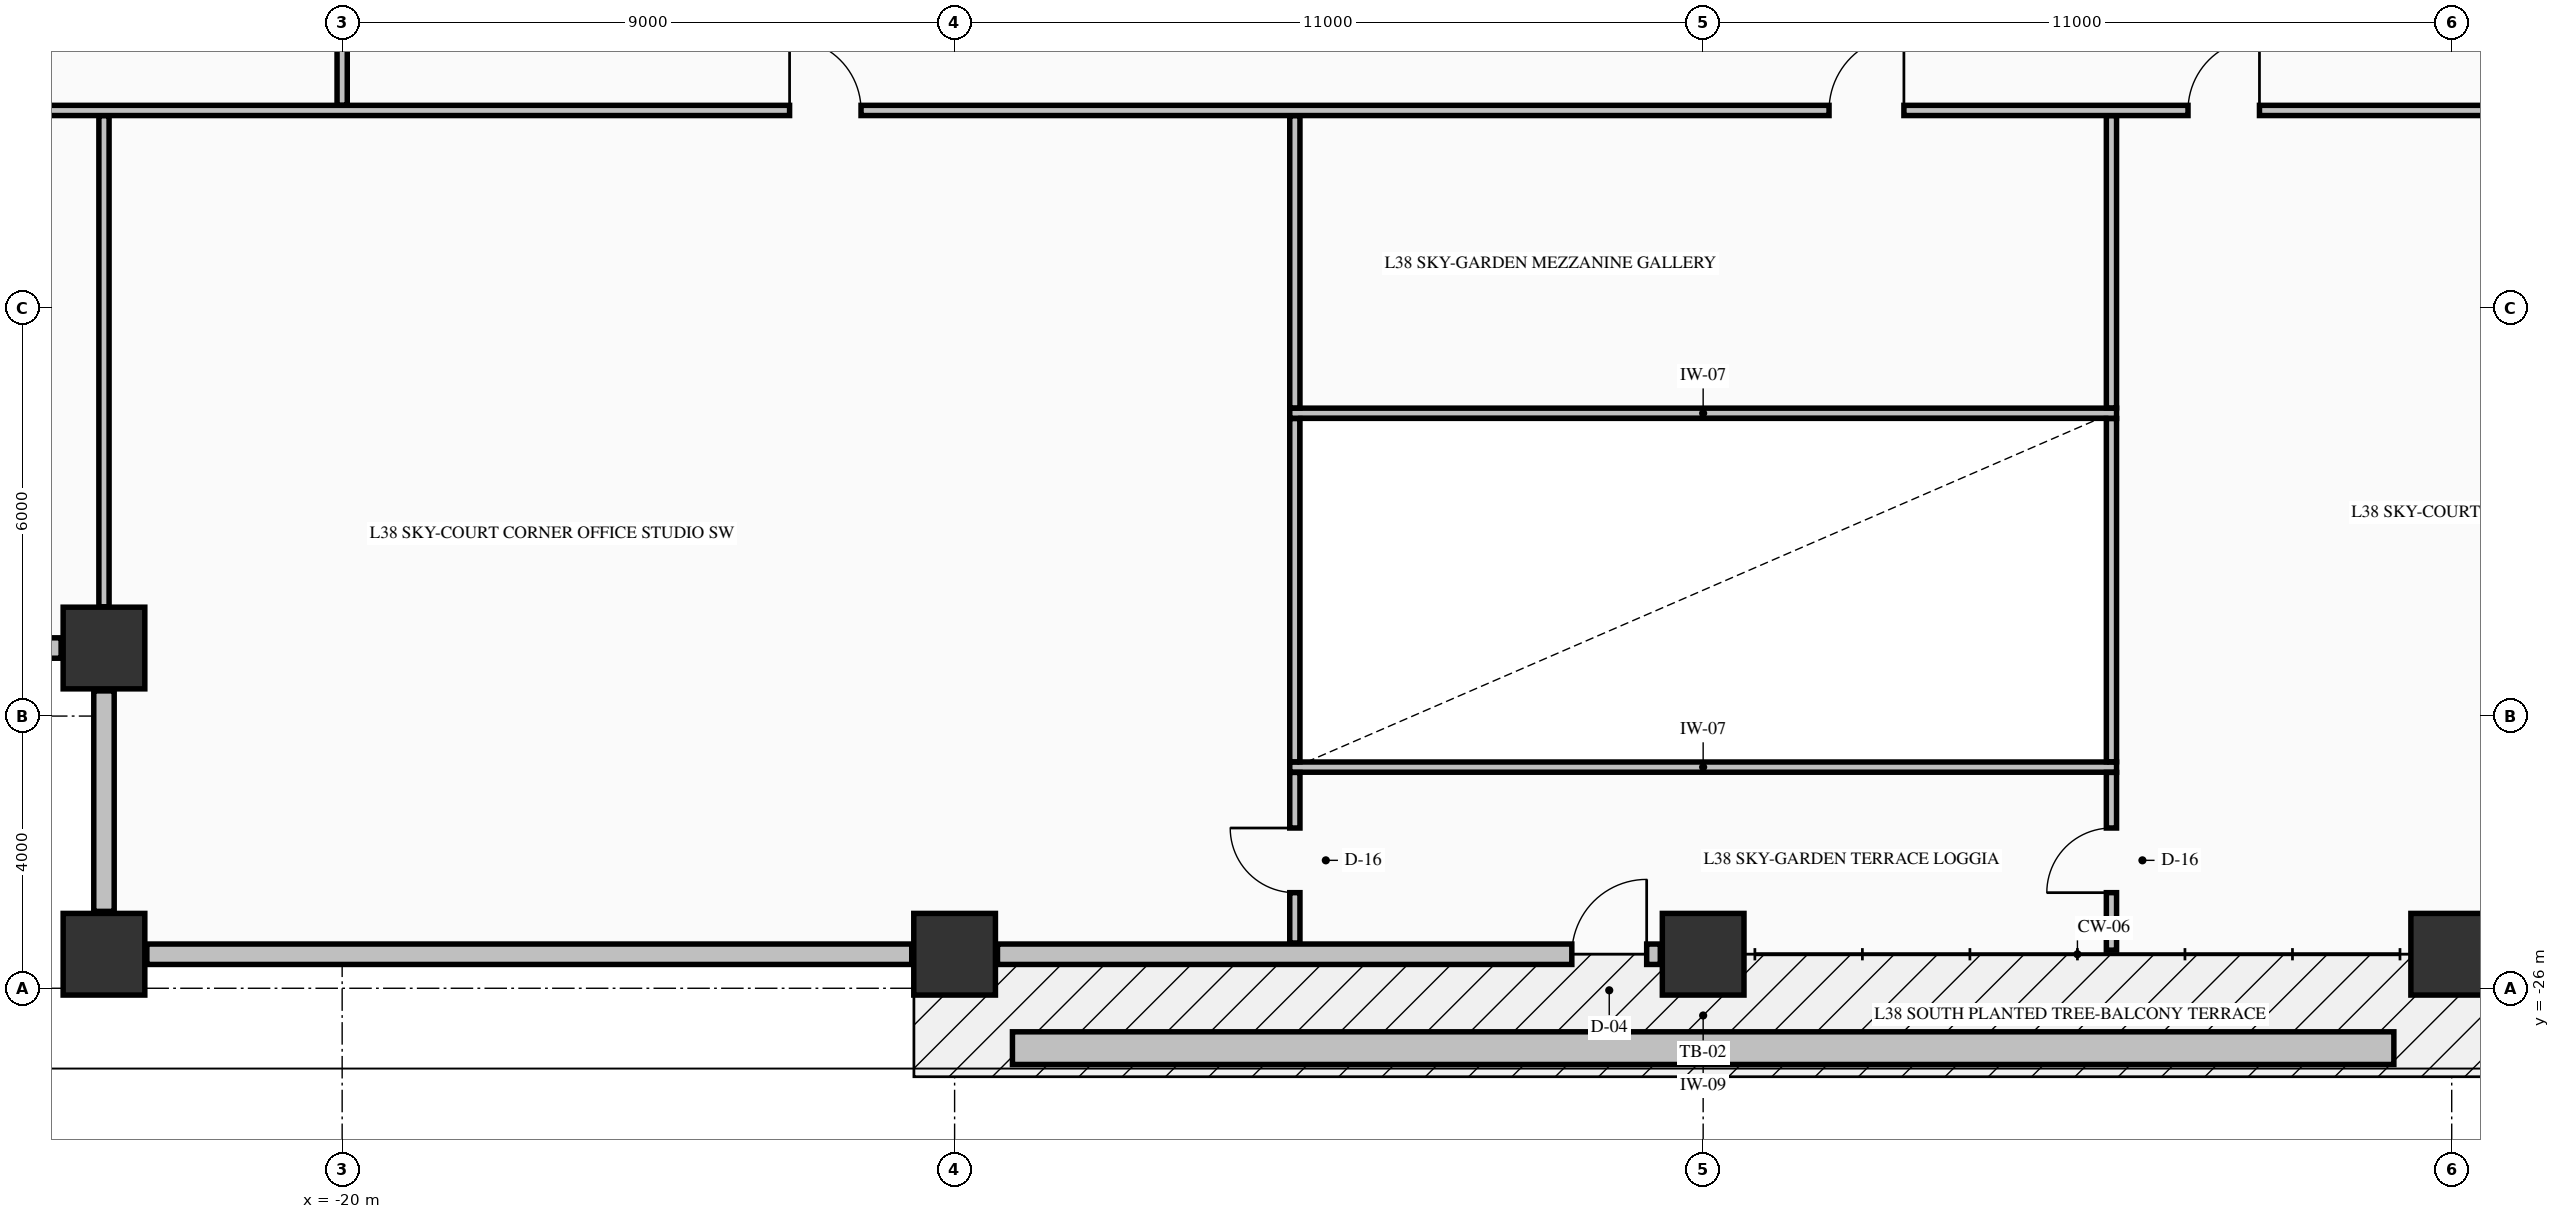
"""IFC4 building model, lengths in metres.
Left out: names, types, materials, properties, quantities, classifications, styles, units other than length and angle.
Written with IfcOpenShell. Run it as: python <this file> out.ifc"""

import sys

from ifc_helpers import new_model, si_unit, direction, frame, frame_2d, origin, origin_2d, place, context, subcontext, project, spatial, rectangle, extrude, element, fill, save


model = new_model("IFC4")
c1 = context("Model", 3, precision=1e-05, world=origin(), true_north=direction((0.0, 1.0)))
c2 = subcontext(c1, "Body", "Model", "MODEL_VIEW")
j1 = project(units=[si_unit("LENGTHUNIT", "METRE"), si_unit("PLANEANGLEUNIT", "RADIAN")], contexts=[c1])
p1 = place(None, origin())
s1 = spatial("IfcSite", under=j1, at=p1, CompositionType="ELEMENT")
p2 = place(p1, origin())
s2 = spatial("IfcBuilding", under=s1, at=p2, CompositionType="ELEMENT")
p3 = place(p2, frame((0.0, 0.0, 149.91)))
s3 = spatial("IfcBuildingStorey", under=s2, at=p3, CompositionType="ELEMENT", Elevation=149.91)
for number, where, z_axis, x_axis in (
    (1, (-23.5, -25.5, -0.25), (0.0, 0.0, 1.0), (1.0, 0.0, 0.0)),
    (2, (-11.0, -25.5, -0.25), (0.0, 0.0, 1.0), (1.0, 0.0, 0.0)),
    (3, (0.0, -25.5, -0.25), (0.0, 0.0, 1.0), (1.0, 0.0, 0.0)),
    (4, (11.0, -25.5, -0.25), (0.0, 0.0, 1.0), (1.0, 0.0, 0.0)),
    (5, (-23.5, -21.0, -0.25), (0.0, 0.0, 1.0), (1.0, 0.0, 0.0)),
):
    element("IfcColumn", number, at=place(p3, frame(where, z_axis=z_axis, x_axis=x_axis)), inside=s3, PredefinedType="COLUMN", context=c2, shape_type="SweptSolid", body=[
        extrude(rectangle(XDim=1.2, YDim=1.2, at=origin_2d()), origin(), (0.0, 0.0, 1.0), 3.395),
    ])
for number, where, z_axis, x_axis in (
    (6, (-27.37, -21.0, 0.0), (0.0, 0.0, 1.0), (1.0, 0.0, 0.0)),
    (7, (-23.5, -21.63, 0.0), (0.0, 0.0, 1.0), (0.0, -1.0, 0.0)),
):
    element("IfcWall", number, at=place(p3, frame(where, z_axis=z_axis, x_axis=x_axis)), inside=s3, PredefinedType="STANDARD", context=c2, shape_type="SweptSolid", body=[
        extrude(rectangle(XDim=3.24, YDim=0.3, at=frame_2d((1.62, 0.0))), origin(), (0.0, 0.0, 1.0), 2.537),
    ])
p4 = place(p3, frame((-22.87, -25.5, 0.0), z_axis=(0.0, 0.0, 1.0), x_axis=(1.0, 0.0, 0.0)))
e8 = element("IfcWall", 8, at=p4, inside=s3, PredefinedType="STANDARD", context=c2, shape_type="SweptSolid", body=[
    extrude(rectangle(XDim=11.24, YDim=0.3, at=frame_2d((5.62, 0.0))), origin(), (0.0, 0.0, 1.0), 2.537),
])
p5 = place(p3, frame((-10.37, -25.5, 0.0), z_axis=(0.0, 0.0, 1.0), x_axis=(1.0, 0.0, 0.0)))
e9 = element("IfcWall", 9, at=p5, inside=s3, PredefinedType="STANDARD", context=c2, shape_type="SweptSolid", body=[
    extrude(rectangle(XDim=9.74, YDim=0.3, at=frame_2d((4.87, 0.0))), origin(), (0.0, 0.0, 1.0), 2.537),
])
p6 = place(p5, frame((8.44, 0.0, 0.0)))
e10 = element("IfcOpeningElement", 10, at=p6, cuts=e9, PredefinedType="OPENING", context=c2, shape_type="SweptSolid", body=[
    extrude(rectangle(XDim=1.1, YDim=2.15, at=frame_2d((0.55, 1.075))), frame((0.0, 0.16, 0.0), z_axis=(0.0, -1.0, 0.0), x_axis=(1.0, 0.0, 0.0)), (0.0, 0.0, 1.0), 0.32),
])
for number, where, z_axis, x_axis in (
    (11, (-6.075, -22.75, 0.0), (0.0, 0.0, 1.0), (1.0, 0.0, 0.0)),
    (12, (-6.075, -17.55, 0.0), (0.0, 0.0, 1.0), (1.0, 0.0, 0.0)),
):
    element("IfcWall", number, at=place(p3, frame(where, z_axis=z_axis, x_axis=x_axis)), inside=s3, PredefinedType="PARTITIONING", context=c2, shape_type="SweptSolid", body=[
        extrude(rectangle(XDim=12.15, YDim=0.15, at=frame_2d((6.075, 0.0))), origin(), (0.0, 0.0, 1.0), 3.145),
    ])
p7 = place(p3, frame((-27.835, -13.1, 0.0), z_axis=(0.0, 0.0, 1.0), x_axis=(1.0, 0.0, 0.0)))
e13 = element("IfcWall", 13, at=p7, inside=s3, PredefinedType="PARTITIONING", context=c2, shape_type="SweptSolid", body=[
    extrude(rectangle(XDim=50.67, YDim=0.15, at=frame_2d((25.335, 0.0))), origin(), (0.0, 0.0, 1.0), 3.145),
])
p8 = place(p7, frame((29.685, 0.0, 0.0)))
e14 = element("IfcOpeningElement", 14, at=p8, cuts=e13, PredefinedType="OPENING", context=c2, shape_type="SweptSolid", body=[
    extrude(rectangle(XDim=1.1, YDim=2.15, at=frame_2d((0.55, 1.075))), frame((0.0, 0.085, 0.0), z_axis=(0.0, -1.0, 0.0), x_axis=(1.0, 0.0, 0.0)), (0.0, 0.0, 1.0), 0.17),
])
p9 = place(p7, frame((14.41, 0.0, 0.0)))
e15 = element("IfcOpeningElement", 15, at=p9, cuts=e13, PredefinedType="OPENING", context=c2, shape_type="SweptSolid", body=[
    extrude(rectangle(XDim=1.05, YDim=2.15, at=frame_2d((0.525, 1.075))), frame((0.0, 0.085, 0.0), z_axis=(0.0, -1.0, 0.0), x_axis=(1.0, 0.0, 0.0)), (0.0, 0.0, 1.0), 0.17),
])
p10 = place(p7, frame((34.96, 0.0, 0.0)))
e16 = element("IfcOpeningElement", 16, at=p10, cuts=e13, PredefinedType="OPENING", context=c2, shape_type="SweptSolid", body=[
    extrude(rectangle(XDim=1.05, YDim=2.15, at=frame_2d((0.525, 1.075))), frame((0.0, 0.085, 0.0), z_axis=(0.0, -1.0, 0.0), x_axis=(1.0, 0.0, 0.0)), (0.0, 0.0, 1.0), 0.17),
])
p11 = place(p3, frame((-23.5, -20.394, 0.0), z_axis=(0.0, 0.0, 1.0), x_axis=(0.0, 1.0, 0.0)))
e17 = element("IfcWall", 17, at=p11, inside=s3, PredefinedType="PARTITIONING", context=c2, shape_type="SweptSolid", body=[
    extrude(rectangle(XDim=7.216, YDim=0.15, at=frame_2d((3.608, 0.0))), origin(), (0.0, 0.0, 1.0), 3.145),
])
p12 = place(p3, frame((-20.0, -13.022, 0.0), z_axis=(0.0, 0.0, 1.0), x_axis=(0.0, 1.0, 0.0)))
e18 = element("IfcWall", 18, at=p12, inside=s3, PredefinedType="PARTITIONING", context=c2, shape_type="SweptSolid", body=[
    extrude(rectangle(XDim=2.566, YDim=0.15, at=frame_2d((1.283, 0.0))), origin(), (0.0, 0.0, 1.0), 2.635),
])
p13 = place(p12, frame((1.027, 0.0, 0.0)))
e19 = element("IfcOpeningElement", 19, at=p13, cuts=e18, PredefinedType="OPENING", context=c2, shape_type="SweptSolid", body=[
    extrude(rectangle(XDim=0.95, YDim=2.15, at=frame_2d((0.475, 1.075))), frame((0.0, 0.085, 0.0), z_axis=(0.0, -1.0, 0.0), x_axis=(1.0, 0.0, 0.0)), (0.0, 0.0, 1.0), 0.17),
])
p14 = place(p3, frame((-6.0, -25.335, 0.0), z_axis=(0.0, 0.0, 1.0), x_axis=(0.0, 1.0, 0.0)))
e20 = element("IfcWall", 20, at=p14, inside=s3, PredefinedType="PARTITIONING", context=c2, shape_type="SweptSolid", body=[
    extrude(rectangle(XDim=2.507, YDim=0.15, at=frame_2d((1.253, 0.0))), origin(), (0.0, 0.0, 1.0), 3.145),
])
p15 = place(p14, frame((0.74, 0.0, 0.0)))
e21 = element("IfcOpeningElement", 21, at=p15, cuts=e20, PredefinedType="OPENING", context=c2, shape_type="SweptSolid", body=[
    extrude(rectangle(XDim=0.95, YDim=2.15, at=frame_2d((0.475, 1.075))), frame((0.0, 0.085, 0.0), z_axis=(0.0, -1.0, 0.0), x_axis=(1.0, 0.0, 0.0)), (0.0, 0.0, 1.0), 0.17),
])
p16 = place(p3, frame((-6.0, -22.672, 0.0), z_axis=(0.0, 0.0, 1.0), x_axis=(0.0, 1.0, 0.0)))
e22 = element("IfcWall", 22, at=p16, inside=s3, PredefinedType="PARTITIONING", context=c2, shape_type="SweptSolid", body=[
    extrude(rectangle(XDim=5.044, YDim=0.15, at=frame_2d((2.522, 0.0))), origin(), (0.0, 0.0, 1.0), 3.145),
])
p17 = place(p3, frame((-6.0, -17.472, 0.0), z_axis=(0.0, 0.0, 1.0), x_axis=(0.0, 1.0, 0.0)))
e23 = element("IfcWall", 23, at=p17, inside=s3, PredefinedType="PARTITIONING", context=c2, shape_type="SweptSolid", body=[
    extrude(rectangle(XDim=4.294, YDim=0.15, at=frame_2d((2.147, 0.0))), origin(), (0.0, 0.0, 1.0), 3.145),
])
p18 = place(p3, frame((6.0, -25.44, 0.0), z_axis=(0.0, 0.0, 1.0), x_axis=(0.0, 1.0, 0.0)))
e24 = element("IfcWall", 24, at=p18, inside=s3, PredefinedType="PARTITIONING", context=c2, shape_type="SweptSolid", body=[
    extrude(rectangle(XDim=2.612, YDim=0.15, at=frame_2d((1.306, 0.0))), origin(), (0.0, 0.0, 1.0), 3.145),
])
p19 = place(p18, frame((0.845, 0.0, 0.0)))
e25 = element("IfcOpeningElement", 25, at=p19, cuts=e24, PredefinedType="OPENING", context=c2, shape_type="SweptSolid", body=[
    extrude(rectangle(XDim=0.95, YDim=2.15, at=frame_2d((0.475, 1.075))), frame((0.0, 0.085, 0.0), z_axis=(0.0, -1.0, 0.0), x_axis=(1.0, 0.0, 0.0)), (0.0, 0.0, 1.0), 0.17),
])
p20 = place(p3, frame((6.0, -22.672, 0.0), z_axis=(0.0, 0.0, 1.0), x_axis=(0.0, 1.0, 0.0)))
e26 = element("IfcWall", 26, at=p20, inside=s3, PredefinedType="PARTITIONING", context=c2, shape_type="SweptSolid", body=[
    extrude(rectangle(XDim=5.044, YDim=0.15, at=frame_2d((2.522, 0.0))), origin(), (0.0, 0.0, 1.0), 3.145),
])
p21 = place(p3, frame((6.0, -17.472, 0.0), z_axis=(0.0, 0.0, 1.0), x_axis=(0.0, 1.0, 0.0)))
e27 = element("IfcWall", 27, at=p21, inside=s3, PredefinedType="PARTITIONING", context=c2, shape_type="SweptSolid", body=[
    extrude(rectangle(XDim=4.294, YDim=0.15, at=frame_2d((2.147, 0.0))), origin(), (0.0, 0.0, 1.0), 3.145),
])
p22 = place(p3, frame((-10.15, -26.88, -0.04), z_axis=(0.0, 0.0, 1.0), x_axis=(1.0, 0.0, 0.0)))
e28 = element("IfcWall", 28, at=p22, inside=s3, PredefinedType="PARAPET", context=c2, shape_type="SweptSolid", body=[
    extrude(rectangle(XDim=20.3, YDim=0.48, at=frame_2d((10.15, 0.0))), origin(), (0.0, 0.0, 1.0), 0.52),
])
p23 = place(p6, origin())
e29 = element("IfcDoor", 29, at=p23, inside=s3, OperationType="SINGLE_SWING_RIGHT", PredefinedType="DOOR", context=c2, shape_type="SweptSolid", body=[
    extrude(rectangle(XDim=1.1, YDim=2.15, at=frame_2d((0.55, 1.075))), frame((0.0, 0.025, 0.0), z_axis=(0.0, -1.0, 0.0), x_axis=(1.0, 0.0, 0.0)), (0.0, 0.0, 1.0), 0.05),
])
fill(e10, e29)
p24 = place(p15, origin())
e30 = element("IfcDoor", 30, at=p24, inside=s3, OperationType="SINGLE_SWING_RIGHT", PredefinedType="DOOR", context=c2, shape_type="SweptSolid", body=[
    extrude(rectangle(XDim=0.95, YDim=2.15, at=frame_2d((0.475, 1.075))), frame((0.0, 0.025, 0.0), z_axis=(0.0, -1.0, 0.0), x_axis=(1.0, 0.0, 0.0)), (0.0, 0.0, 1.0), 0.05),
])
fill(e21, e30)
p25 = place(p19, origin())
e31 = element("IfcDoor", 31, at=p25, inside=s3, OperationType="SINGLE_SWING_LEFT", PredefinedType="DOOR", context=c2, shape_type="SweptSolid", body=[
    extrude(rectangle(XDim=0.95, YDim=2.15, at=frame_2d((0.475, 1.075))), frame((0.0, 0.025, 0.0), z_axis=(0.0, -1.0, 0.0), x_axis=(1.0, 0.0, 0.0)), (0.0, 0.0, 1.0), 0.05),
])
fill(e25, e31)
p26 = place(p8, origin())
e32 = element("IfcDoor", 32, at=p26, inside=s3, OperationType="SINGLE_SWING_RIGHT", PredefinedType="DOOR", context=c2, shape_type="SweptSolid", body=[
    extrude(rectangle(XDim=1.1, YDim=2.15, at=frame_2d((0.55, 1.075))), frame((0.0, 0.025, 0.0), z_axis=(0.0, -1.0, 0.0), x_axis=(1.0, 0.0, 0.0)), (0.0, 0.0, 1.0), 0.05),
])
fill(e14, e32)
p27 = place(p9, origin())
e33 = element("IfcDoor", 33, at=p27, inside=s3, OperationType="SINGLE_SWING_LEFT", PredefinedType="DOOR", context=c2, shape_type="SweptSolid", body=[
    extrude(rectangle(XDim=1.05, YDim=2.15, at=frame_2d((0.525, 1.075))), frame((0.0, 0.025, 0.0), z_axis=(0.0, -1.0, 0.0), x_axis=(1.0, 0.0, 0.0)), (0.0, 0.0, 1.0), 0.05),
])
fill(e15, e33)
p28 = place(p10, origin())
e34 = element("IfcDoor", 34, at=p28, inside=s3, OperationType="SINGLE_SWING_RIGHT", PredefinedType="DOOR", context=c2, shape_type="SweptSolid", body=[
    extrude(rectangle(XDim=1.05, YDim=2.15, at=frame_2d((0.525, 1.075))), frame((0.0, 0.025, 0.0), z_axis=(0.0, -1.0, 0.0), x_axis=(1.0, 0.0, 0.0)), (0.0, 0.0, 1.0), 0.05),
])
fill(e16, e34)
save(model, sys.argv[1])
